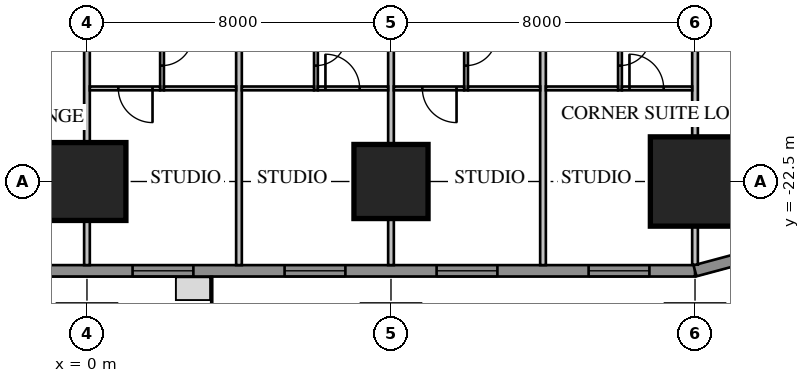
"""IFC4 building model, lengths in metres.
Left out: names, types, materials, properties, quantities, classifications, styles, units other than length and angle.
Written with IfcOpenShell. Run it as: python <this file> out.ifc"""

import sys

from ifc_helpers import new_model, si_unit, direction, frame, frame_2d, origin, origin_2d, place, context, subcontext, project, spatial, rectangle, extrude, element, fill, save


model = new_model("IFC4")
c1 = context("Model", 3, precision=1e-05, world=origin(), true_north=direction((0.0, 1.0)))
c2 = subcontext(c1, "Body", "Model", "MODEL_VIEW")
j1 = project(units=[si_unit("LENGTHUNIT", "METRE"), si_unit("PLANEANGLEUNIT", "RADIAN")], contexts=[c1])
p1 = place(None, origin())
s1 = spatial("IfcSite", under=j1, at=p1, CompositionType="ELEMENT")
p2 = place(p1, origin())
s2 = spatial("IfcBuilding", under=s1, at=p2, CompositionType="ELEMENT")
p3 = place(p2, frame((0.0, 0.0, 39.1)))
s3 = spatial("IfcBuildingStorey", under=s2, at=p3, CompositionType="ELEMENT", Elevation=39.1)
p4 = place(p3, frame((0.0, -22.5, 0.0), z_axis=(0.0, 0.0, 1.0), x_axis=(1.0, 0.0, 0.0)))
e1 = element("IfcColumn", 1, at=p4, inside=s3, PredefinedType="COLUMN", context=c2, shape_type="SweptSolid", body=[
    extrude(rectangle(XDim=2.05, YDim=2.05, at=origin_2d()), origin(), (0.0, 0.0, 1.0), 3.85),
])
p5 = place(p3, frame((8.0, -22.5, 0.0), z_axis=(0.0, 0.0, 1.0), x_axis=(1.0, 0.0, 0.0)))
e2 = element("IfcColumn", 2, at=p5, inside=s3, PredefinedType="COLUMN", context=c2, shape_type="SweptSolid", body=[
    extrude(rectangle(XDim=1.95, YDim=1.95, at=origin_2d()), origin(), (0.0, 0.0, 1.0), 3.85),
])
p6 = place(p3, frame((16.0, -22.5, 0.0), z_axis=(0.0, 0.0, 1.0), x_axis=(1.0, 0.0, 0.0)))
e3 = element("IfcColumn", 3, at=p6, inside=s3, PredefinedType="COLUMN", context=c2, shape_type="SweptSolid", body=[
    extrude(rectangle(XDim=2.35, YDim=2.35, at=origin_2d()), origin(), (0.0, 0.0, 1.0), 3.85),
])
p7 = place(p3, frame((-16.0, -24.85, 0.0), z_axis=(0.0, 0.0, 1.0), x_axis=(1.0, 0.0, 0.0)))
e4 = element("IfcWall", 4, at=p7, inside=s3, PredefinedType="SOLIDWALL", context=c2, shape_type="SweptSolid", body=[
    extrude(rectangle(XDim=32.0, YDim=0.3, at=frame_2d((16.0, 0.0))), origin(), (0.0, 0.0, 1.0), 3.65),
])
p8 = place(p7, frame((1.2, 0.0, 0.75)))
e5 = element("IfcOpeningElement", 5, at=p8, cuts=e4, PredefinedType="OPENING", context=c2, shape_type="SweptSolid", body=[
    extrude(rectangle(XDim=1.6, YDim=1.8, at=frame_2d((0.8, 0.9))), frame((0.0, 0.17, 0.0), z_axis=(0.0, -1.0, 0.0), x_axis=(1.0, 0.0, 0.0)), (0.0, 0.0, 1.0), 0.34),
])
p9 = place(p7, frame((5.2, 0.0, 0.75)))
e6 = element("IfcOpeningElement", 6, at=p9, cuts=e4, PredefinedType="OPENING", context=c2, shape_type="SweptSolid", body=[
    extrude(rectangle(XDim=1.6, YDim=1.8, at=frame_2d((0.8, 0.9))), frame((0.0, 0.17, 0.0), z_axis=(0.0, -1.0, 0.0), x_axis=(1.0, 0.0, 0.0)), (0.0, 0.0, 1.0), 0.34),
])
p10 = place(p7, frame((17.2, 0.0, 0.75)))
e7 = element("IfcOpeningElement", 7, at=p10, cuts=e4, PredefinedType="OPENING", context=c2, shape_type="SweptSolid", body=[
    extrude(rectangle(XDim=1.6, YDim=1.8, at=frame_2d((0.8, 0.9))), frame((0.0, 0.17, 0.0), z_axis=(0.0, -1.0, 0.0), x_axis=(1.0, 0.0, 0.0)), (0.0, 0.0, 1.0), 0.34),
])
p11 = place(p7, frame((21.2, 0.0, 0.75)))
e8 = element("IfcOpeningElement", 8, at=p11, cuts=e4, PredefinedType="OPENING", context=c2, shape_type="SweptSolid", body=[
    extrude(rectangle(XDim=1.6, YDim=1.8, at=frame_2d((0.8, 0.9))), frame((0.0, 0.17, 0.0), z_axis=(0.0, -1.0, 0.0), x_axis=(1.0, 0.0, 0.0)), (0.0, 0.0, 1.0), 0.34),
])
p12 = place(p7, frame((25.2, 0.0, 0.75)))
e9 = element("IfcOpeningElement", 9, at=p12, cuts=e4, PredefinedType="OPENING", context=c2, shape_type="SweptSolid", body=[
    extrude(rectangle(XDim=1.6, YDim=1.8, at=frame_2d((0.8, 0.9))), frame((0.0, 0.17, 0.0), z_axis=(0.0, -1.0, 0.0), x_axis=(1.0, 0.0, 0.0)), (0.0, 0.0, 1.0), 0.34),
])
p13 = place(p7, frame((29.2, 0.0, 0.75)))
e10 = element("IfcOpeningElement", 10, at=p13, cuts=e4, PredefinedType="OPENING", context=c2, shape_type="SweptSolid", body=[
    extrude(rectangle(XDim=1.6, YDim=1.8, at=frame_2d((0.8, 0.9))), frame((0.0, 0.17, 0.0), z_axis=(0.0, -1.0, 0.0), x_axis=(1.0, 0.0, 0.0)), (0.0, 0.0, 1.0), 0.34),
])
p14 = place(p7, frame((8.8, 0.0, 0.75)))
e11 = element("IfcOpeningElement", 11, at=p14, cuts=e4, PredefinedType="OPENING", context=c2, shape_type="SweptSolid", body=[
    extrude(rectangle(XDim=2.4, YDim=1.8, at=frame_2d((1.2, 0.9))), frame((0.0, 0.17, 0.0), z_axis=(0.0, -1.0, 0.0), x_axis=(1.0, 0.0, 0.0)), (0.0, 0.0, 1.0), 0.34),
])
p15 = place(p7, frame((13.812, 0.0, 0.0)))
e12 = element("IfcOpeningElement", 12, at=p15, cuts=e4, PredefinedType="OPENING", context=c2, shape_type="SweptSolid", body=[
    extrude(rectangle(XDim=1.0, YDim=2.4, at=frame_2d((0.5, 1.2))), frame((0.0, 0.17, 0.0), z_axis=(0.0, -1.0, 0.0), x_axis=(1.0, 0.0, 0.0)), (0.0, 0.0, 1.0), 0.34),
])
p16 = place(p3, frame((16.0, -24.85, 0.0), z_axis=(0.0, 0.0, 1.0), x_axis=(0.965920218567, 0.258839972501, 0.0)))
e13 = element("IfcWall", 13, at=p16, inside=s3, PredefinedType="SOLIDWALL", context=c2, shape_type="SweptSolid", body=[
    extrude(rectangle(XDim=4.581, YDim=0.3, at=frame_2d((2.291, 0.0))), origin(), (0.0, 0.0, 1.0), 3.65),
])
p17 = place(p3, frame((0.0, -18.1, 0.0), z_axis=(0.0, 0.0, 1.0), x_axis=(0.0, -1.0, 0.0)))
e14 = element("IfcWall", 14, at=p17, inside=s3, PredefinedType="PARTITIONING", context=c2, shape_type="SweptSolid", body=[
    extrude(rectangle(XDim=6.6, YDim=0.15, at=frame_2d((3.3, 0.0))), origin(), (0.0, 0.0, 1.0), 2.809),
])
for number, where, z_axis, x_axis in (
    (15, (4.0, -18.1, 0.0), (0.0, 0.0, 1.0), (0.0, -1.0, 0.0)),
    (16, (8.0, -18.1, 0.0), (0.0, 0.0, 1.0), (0.0, -1.0, 0.0)),
    (17, (12.0, -18.1, 0.0), (0.0, 0.0, 1.0), (0.0, -1.0, 0.0)),
):
    element("IfcWall", number, at=place(p3, frame(where, z_axis=z_axis, x_axis=x_axis)), inside=s3, PredefinedType="PARTITIONING", context=c2, shape_type="SweptSolid", body=[
        extrude(rectangle(XDim=6.6, YDim=0.15, at=frame_2d((3.3, 0.0))), origin(), (0.0, 0.0, 1.0), 3.65),
    ])
p18 = place(p3, frame((16.0, -18.1, 0.0), z_axis=(0.0, 0.0, 1.0), x_axis=(0.0, -1.0, 0.0)))
e18 = element("IfcWall", 18, at=p18, inside=s3, PredefinedType="PARTITIONING", context=c2, shape_type="SweptSolid", body=[
    extrude(rectangle(XDim=6.589, YDim=0.15, at=frame_2d((3.295, 0.0))), origin(), (0.0, 0.0, 1.0), 3.65),
])
p19 = place(p3, frame((1.975, -18.1, 0.0), z_axis=(0.0, 0.0, 1.0), x_axis=(0.0, -1.0, 0.0)))
e19 = element("IfcWall", 19, at=p19, inside=s3, PredefinedType="PARTITIONING", context=c2, shape_type="SweptSolid", body=[
    extrude(rectangle(XDim=2.0, YDim=0.1, at=frame_2d((1.0, 0.0))), origin(), (0.0, 0.0, 1.0), 3.65),
])
p20 = place(p19, frame((0.55, 0.0, 0.0)))
e20 = element("IfcOpeningElement", 20, at=p20, cuts=e19, PredefinedType="OPENING", context=c2, shape_type="SweptSolid", body=[
    extrude(rectangle(XDim=0.8, YDim=2.1, at=frame_2d((0.4, 1.05))), frame((0.0, 0.07, 0.0), z_axis=(0.0, -1.0, 0.0), x_axis=(1.0, 0.0, 0.0)), (0.0, 0.0, 1.0), 0.14),
])
p21 = place(p3, frame((2.025, -20.05, 0.0), z_axis=(0.0, 0.0, 1.0), x_axis=(1.0, 0.0, 0.0)))
e21 = element("IfcWall", 21, at=p21, inside=s3, PredefinedType="PARTITIONING", context=c2, shape_type="SweptSolid", body=[
    extrude(rectangle(XDim=1.9, YDim=0.1, at=frame_2d((0.95, 0.0))), origin(), (0.0, 0.0, 1.0), 3.65),
])
p22 = place(p3, frame((6.025, -18.1, 0.0), z_axis=(0.0, 0.0, 1.0), x_axis=(0.0, -1.0, 0.0)))
e22 = element("IfcWall", 22, at=p22, inside=s3, PredefinedType="PARTITIONING", context=c2, shape_type="SweptSolid", body=[
    extrude(rectangle(XDim=2.0, YDim=0.1, at=frame_2d((1.0, 0.0))), origin(), (0.0, 0.0, 1.0), 3.65),
])
p23 = place(p22, frame((0.55, 0.0, 0.0)))
e23 = element("IfcOpeningElement", 23, at=p23, cuts=e22, PredefinedType="OPENING", context=c2, shape_type="SweptSolid", body=[
    extrude(rectangle(XDim=0.8, YDim=2.1, at=frame_2d((0.4, 1.05))), frame((0.0, 0.07, 0.0), z_axis=(0.0, -1.0, 0.0), x_axis=(1.0, 0.0, 0.0)), (0.0, 0.0, 1.0), 0.14),
])
p24 = place(p3, frame((4.075, -20.05, 0.0), z_axis=(0.0, 0.0, 1.0), x_axis=(1.0, 0.0, 0.0)))
e24 = element("IfcWall", 24, at=p24, inside=s3, PredefinedType="PARTITIONING", context=c2, shape_type="SweptSolid", body=[
    extrude(rectangle(XDim=1.9, YDim=0.1, at=frame_2d((0.95, 0.0))), origin(), (0.0, 0.0, 1.0), 3.65),
])
p25 = place(p3, frame((9.975, -18.1, 0.0), z_axis=(0.0, 0.0, 1.0), x_axis=(0.0, -1.0, 0.0)))
e25 = element("IfcWall", 25, at=p25, inside=s3, PredefinedType="PARTITIONING", context=c2, shape_type="SweptSolid", body=[
    extrude(rectangle(XDim=2.0, YDim=0.1, at=frame_2d((1.0, 0.0))), origin(), (0.0, 0.0, 1.0), 3.65),
])
p26 = place(p25, frame((0.55, 0.0, 0.0)))
e26 = element("IfcOpeningElement", 26, at=p26, cuts=e25, PredefinedType="OPENING", context=c2, shape_type="SweptSolid", body=[
    extrude(rectangle(XDim=0.8, YDim=2.1, at=frame_2d((0.4, 1.05))), frame((0.0, 0.07, 0.0), z_axis=(0.0, -1.0, 0.0), x_axis=(1.0, 0.0, 0.0)), (0.0, 0.0, 1.0), 0.14),
])
p27 = place(p3, frame((10.025, -20.05, 0.0), z_axis=(0.0, 0.0, 1.0), x_axis=(1.0, 0.0, 0.0)))
e27 = element("IfcWall", 27, at=p27, inside=s3, PredefinedType="PARTITIONING", context=c2, shape_type="SweptSolid", body=[
    extrude(rectangle(XDim=1.9, YDim=0.1, at=frame_2d((0.95, 0.0))), origin(), (0.0, 0.0, 1.0), 3.65),
])
p28 = place(p3, frame((14.025, -18.1, 0.0), z_axis=(0.0, 0.0, 1.0), x_axis=(0.0, -1.0, 0.0)))
e28 = element("IfcWall", 28, at=p28, inside=s3, PredefinedType="PARTITIONING", context=c2, shape_type="SweptSolid", body=[
    extrude(rectangle(XDim=2.0, YDim=0.1, at=frame_2d((1.0, 0.0))), origin(), (0.0, 0.0, 1.0), 3.65),
])
p29 = place(p28, frame((0.55, 0.0, 0.0)))
e29 = element("IfcOpeningElement", 29, at=p29, cuts=e28, PredefinedType="OPENING", context=c2, shape_type="SweptSolid", body=[
    extrude(rectangle(XDim=0.8, YDim=2.1, at=frame_2d((0.4, 1.05))), frame((0.0, 0.07, 0.0), z_axis=(0.0, -1.0, 0.0), x_axis=(1.0, 0.0, 0.0)), (0.0, 0.0, 1.0), 0.14),
])
p30 = place(p3, frame((12.075, -20.05, 0.0), z_axis=(0.0, 0.0, 1.0), x_axis=(1.0, 0.0, 0.0)))
e30 = element("IfcWall", 30, at=p30, inside=s3, PredefinedType="PARTITIONING", context=c2, shape_type="SweptSolid", body=[
    extrude(rectangle(XDim=1.9, YDim=0.1, at=frame_2d((0.95, 0.0))), origin(), (0.0, 0.0, 1.0), 3.65),
])
p31 = place(p3, frame((0.075, -20.05, 0.0), z_axis=(0.0, 0.0, 1.0), x_axis=(1.0, 0.0, 0.0)))
e31 = element("IfcWall", 31, at=p31, inside=s3, PredefinedType="PARTITIONING", context=c2, shape_type="SweptSolid", body=[
    extrude(rectangle(XDim=1.85, YDim=0.1, at=frame_2d((0.925, 0.0))), origin(), (0.0, 0.0, 1.0), 3.65),
])
p32 = place(p31, frame((0.75, 0.0, 0.0)))
e32 = element("IfcOpeningElement", 32, at=p32, cuts=e31, PredefinedType="OPENING", context=c2, shape_type="SweptSolid", body=[
    extrude(rectangle(XDim=0.9, YDim=2.1, at=frame_2d((0.45, 1.05))), frame((0.0, 0.07, 0.0), z_axis=(0.0, -1.0, 0.0), x_axis=(1.0, 0.0, 0.0)), (0.0, 0.0, 1.0), 0.14),
])
p33 = place(p3, frame((6.075, -20.05, 0.0), z_axis=(0.0, 0.0, 1.0), x_axis=(1.0, 0.0, 0.0)))
e33 = element("IfcWall", 33, at=p33, inside=s3, PredefinedType="PARTITIONING", context=c2, shape_type="SweptSolid", body=[
    extrude(rectangle(XDim=1.85, YDim=0.1, at=frame_2d((0.925, 0.0))), origin(), (0.0, 0.0, 1.0), 3.65),
])
p34 = place(p33, frame((0.2, 0.0, 0.0)))
e34 = element("IfcOpeningElement", 34, at=p34, cuts=e33, PredefinedType="OPENING", context=c2, shape_type="SweptSolid", body=[
    extrude(rectangle(XDim=0.9, YDim=2.1, at=frame_2d((0.45, 1.05))), frame((0.0, 0.07, 0.0), z_axis=(0.0, -1.0, 0.0), x_axis=(1.0, 0.0, 0.0)), (0.0, 0.0, 1.0), 0.14),
])
p35 = place(p3, frame((8.075, -20.05, 0.0), z_axis=(0.0, 0.0, 1.0), x_axis=(1.0, 0.0, 0.0)))
e35 = element("IfcWall", 35, at=p35, inside=s3, PredefinedType="PARTITIONING", context=c2, shape_type="SweptSolid", body=[
    extrude(rectangle(XDim=1.85, YDim=0.1, at=frame_2d((0.925, 0.0))), origin(), (0.0, 0.0, 1.0), 3.65),
])
p36 = place(p35, frame((0.75, 0.0, 0.0)))
e36 = element("IfcOpeningElement", 36, at=p36, cuts=e35, PredefinedType="OPENING", context=c2, shape_type="SweptSolid", body=[
    extrude(rectangle(XDim=0.9, YDim=2.1, at=frame_2d((0.45, 1.05))), frame((0.0, 0.07, 0.0), z_axis=(0.0, -1.0, 0.0), x_axis=(1.0, 0.0, 0.0)), (0.0, 0.0, 1.0), 0.14),
])
p37 = place(p3, frame((14.075, -20.05, 0.0), z_axis=(0.0, 0.0, 1.0), x_axis=(1.0, 0.0, 0.0)))
e37 = element("IfcWall", 37, at=p37, inside=s3, PredefinedType="PARTITIONING", context=c2, shape_type="SweptSolid", body=[
    extrude(rectangle(XDim=1.85, YDim=0.1, at=frame_2d((0.925, 0.0))), origin(), (0.0, 0.0, 1.0), 3.65),
])
p38 = place(p37, frame((0.2, 0.0, 0.0)))
e38 = element("IfcOpeningElement", 38, at=p38, cuts=e37, PredefinedType="OPENING", context=c2, shape_type="SweptSolid", body=[
    extrude(rectangle(XDim=0.9, YDim=2.1, at=frame_2d((0.45, 1.05))), frame((0.0, 0.07, 0.0), z_axis=(0.0, -1.0, 0.0), x_axis=(1.0, 0.0, 0.0)), (0.0, 0.0, 1.0), 0.14),
])
p39 = place(p10, origin())
e39 = element("IfcWindow", 39, at=p39, inside=s3, PartitioningType="SINGLE_PANEL", PredefinedType="WINDOW", context=c2, shape_type="SweptSolid", body=[
    extrude(rectangle(XDim=1.6, YDim=1.8, at=frame_2d((0.8, 0.9))), frame((0.0, 0.03, 0.0), z_axis=(0.0, -1.0, 0.0), x_axis=(1.0, 0.0, 0.0)), (0.0, 0.0, 1.0), 0.06),
])
fill(e7, e39)
p40 = place(p11, origin())
e40 = element("IfcWindow", 40, at=p40, inside=s3, PartitioningType="SINGLE_PANEL", PredefinedType="WINDOW", context=c2, shape_type="SweptSolid", body=[
    extrude(rectangle(XDim=1.6, YDim=1.8, at=frame_2d((0.8, 0.9))), frame((0.0, 0.03, 0.0), z_axis=(0.0, -1.0, 0.0), x_axis=(1.0, 0.0, 0.0)), (0.0, 0.0, 1.0), 0.06),
])
fill(e8, e40)
p41 = place(p12, origin())
e41 = element("IfcWindow", 41, at=p41, inside=s3, PartitioningType="SINGLE_PANEL", PredefinedType="WINDOW", context=c2, shape_type="SweptSolid", body=[
    extrude(rectangle(XDim=1.6, YDim=1.8, at=frame_2d((0.8, 0.9))), frame((0.0, 0.03, 0.0), z_axis=(0.0, -1.0, 0.0), x_axis=(1.0, 0.0, 0.0)), (0.0, 0.0, 1.0), 0.06),
])
fill(e9, e41)
p42 = place(p13, origin())
e42 = element("IfcWindow", 42, at=p42, inside=s3, PartitioningType="SINGLE_PANEL", PredefinedType="WINDOW", context=c2, shape_type="SweptSolid", body=[
    extrude(rectangle(XDim=1.6, YDim=1.8, at=frame_2d((0.8, 0.9))), frame((0.0, 0.03, 0.0), z_axis=(0.0, -1.0, 0.0), x_axis=(1.0, 0.0, 0.0)), (0.0, 0.0, 1.0), 0.06),
])
fill(e10, e42)
p43 = place(p20, origin())
e43 = element("IfcDoor", 43, at=p43, inside=s3, OperationType="SINGLE_SWING_LEFT", PredefinedType="DOOR", context=c2, shape_type="SweptSolid", body=[
    extrude(rectangle(XDim=0.8, YDim=2.1, at=frame_2d((0.4, 1.05))), frame((0.0, 0.025, 0.0), z_axis=(0.0, -1.0, 0.0), x_axis=(1.0, 0.0, 0.0)), (0.0, 0.0, 1.0), 0.05),
])
fill(e20, e43)
p44 = place(p23, origin())
e44 = element("IfcDoor", 44, at=p44, inside=s3, OperationType="SINGLE_SWING_LEFT", PredefinedType="DOOR", context=c2, shape_type="SweptSolid", body=[
    extrude(rectangle(XDim=0.8, YDim=2.1, at=frame_2d((0.4, 1.05))), frame((0.0, 0.025, 0.0), z_axis=(0.0, -1.0, 0.0), x_axis=(1.0, 0.0, 0.0)), (0.0, 0.0, 1.0), 0.05),
])
fill(e23, e44)
p45 = place(p26, origin())
e45 = element("IfcDoor", 45, at=p45, inside=s3, OperationType="SINGLE_SWING_LEFT", PredefinedType="DOOR", context=c2, shape_type="SweptSolid", body=[
    extrude(rectangle(XDim=0.8, YDim=2.1, at=frame_2d((0.4, 1.05))), frame((0.0, 0.025, 0.0), z_axis=(0.0, -1.0, 0.0), x_axis=(1.0, 0.0, 0.0)), (0.0, 0.0, 1.0), 0.05),
])
fill(e26, e45)
p46 = place(p29, origin())
e46 = element("IfcDoor", 46, at=p46, inside=s3, OperationType="SINGLE_SWING_LEFT", PredefinedType="DOOR", context=c2, shape_type="SweptSolid", body=[
    extrude(rectangle(XDim=0.8, YDim=2.1, at=frame_2d((0.4, 1.05))), frame((0.0, 0.025, 0.0), z_axis=(0.0, -1.0, 0.0), x_axis=(1.0, 0.0, 0.0)), (0.0, 0.0, 1.0), 0.05),
])
fill(e29, e46)
p47 = place(p32, origin())
e47 = element("IfcDoor", 47, at=p47, inside=s3, OperationType="SINGLE_SWING_RIGHT", PredefinedType="DOOR", context=c2, shape_type="SweptSolid", body=[
    extrude(rectangle(XDim=0.9, YDim=2.1, at=frame_2d((0.45, 1.05))), frame((0.0, 0.025, 0.0), z_axis=(0.0, -1.0, 0.0), x_axis=(1.0, 0.0, 0.0)), (0.0, 0.0, 1.0), 0.05),
])
fill(e32, e47)
p48 = place(p34, origin())
e48 = element("IfcDoor", 48, at=p48, inside=s3, OperationType="SINGLE_SWING_LEFT", PredefinedType="DOOR", context=c2, shape_type="SweptSolid", body=[
    extrude(rectangle(XDim=0.9, YDim=2.1, at=frame_2d((0.45, 1.05))), frame((0.0, 0.025, 0.0), z_axis=(0.0, -1.0, 0.0), x_axis=(1.0, 0.0, 0.0)), (0.0, 0.0, 1.0), 0.05),
])
fill(e34, e48)
p49 = place(p36, origin())
e49 = element("IfcDoor", 49, at=p49, inside=s3, OperationType="SINGLE_SWING_RIGHT", PredefinedType="DOOR", context=c2, shape_type="SweptSolid", body=[
    extrude(rectangle(XDim=0.9, YDim=2.1, at=frame_2d((0.45, 1.05))), frame((0.0, 0.025, 0.0), z_axis=(0.0, -1.0, 0.0), x_axis=(1.0, 0.0, 0.0)), (0.0, 0.0, 1.0), 0.05),
])
fill(e36, e49)
p50 = place(p38, origin())
e50 = element("IfcDoor", 50, at=p50, inside=s3, OperationType="SINGLE_SWING_LEFT", PredefinedType="DOOR", context=c2, shape_type="SweptSolid", body=[
    extrude(rectangle(XDim=0.9, YDim=2.1, at=frame_2d((0.45, 1.05))), frame((0.0, 0.025, 0.0), z_axis=(0.0, -1.0, 0.0), x_axis=(1.0, 0.0, 0.0)), (0.0, 0.0, 1.0), 0.05),
])
fill(e38, e50)
save(model, sys.argv[1])
